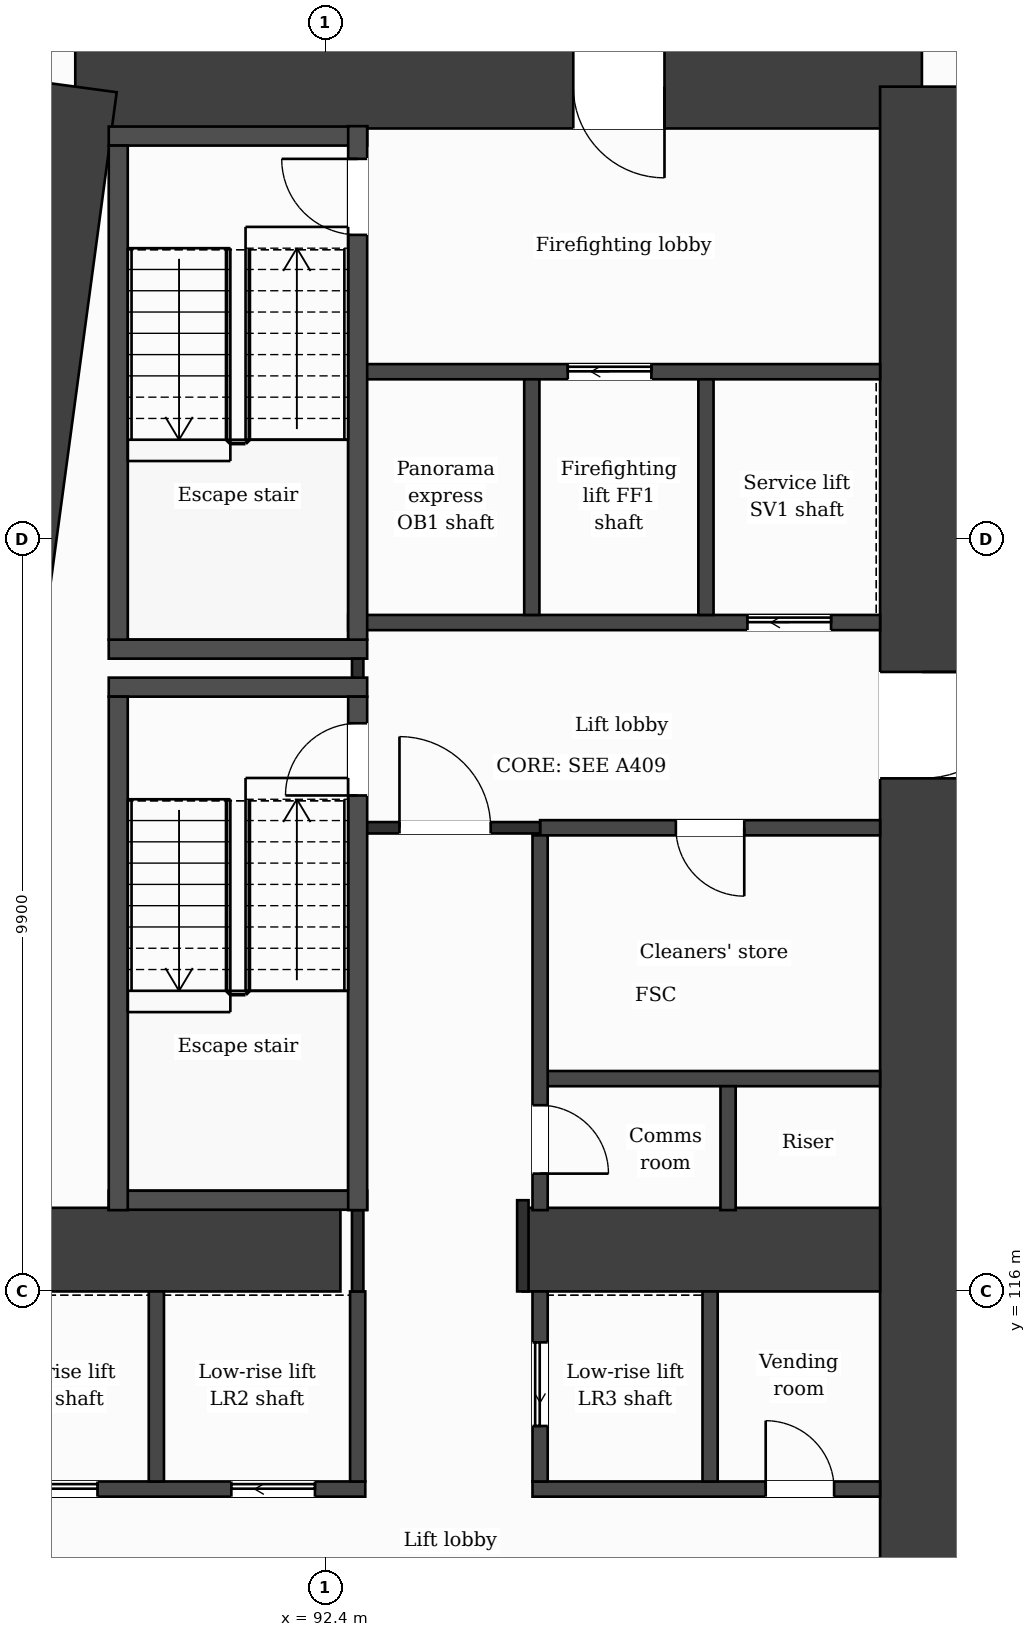
"""IFC4 building model, lengths in metres.
Left out: names, types, materials, properties, quantities, classifications, styles, units other than length and angle.
Written with IfcOpenShell. Run it as: python <this file> out.ifc"""

import sys

from ifc_helpers import new_model, si_unit, direction, frame, frame_2d, origin, place, context, subcontext, project, spatial, rectangle, extrude, element, fill, save


model = new_model("IFC4")
c1 = context("Model", 3, precision=1e-05, world=origin(), true_north=direction((0.0, 1.0)))
c2 = subcontext(c1, "Body", "Model", "MODEL_VIEW")
j1 = project(units=[si_unit("LENGTHUNIT", "METRE"), si_unit("PLANEANGLEUNIT", "RADIAN")], contexts=[c1])
p1 = place(None, origin())
s1 = spatial("IfcSite", under=j1, at=p1, CompositionType="ELEMENT")
p2 = place(p1, origin())
s2 = spatial("IfcBuilding", under=s1, at=p2, CompositionType="ELEMENT")
p3 = place(p2, frame((0.0, 0.0, 46.0)))
s3 = spatial("IfcBuildingStorey", under=s2, at=p3, CompositionType="ELEMENT", Elevation=46.0)
p4 = place(p3, frame((89.112, 131.85, 0.0), z_axis=(0.0, 0.0, 1.0), x_axis=(1.0, 0.0, 0.0)))
e1 = element("IfcWall", 1, at=p4, inside=s3, PredefinedType="SHEAR", context=c2, shape_type="SweptSolid", body=[
    extrude(rectangle(XDim=11.138, YDim=1.1, at=frame_2d((5.569, 0.0))), origin(), (0.0, 0.0, 1.0), 3.5),
])
p5 = place(p4, frame((6.552, 0.0, 0.0)))
e2 = element("IfcOpeningElement", 2, at=p5, cuts=e1, PredefinedType="OPENING", context=c2, shape_type="SweptSolid", body=[
    extrude(rectangle(XDim=1.2, YDim=2.1, at=frame_2d((0.6, 1.05))), frame((0.0, 0.56, 0.0), z_axis=(0.0, -1.0, 0.0), x_axis=(1.0, 0.0, 0.0)), (0.0, 0.0, 1.0), 1.12),
])
p6 = place(p3, frame((100.25, 131.85, 0.0), z_axis=(0.0, 0.0, 1.0), x_axis=(0.0, -1.0, 0.0)))
e3 = element("IfcWall", 3, at=p6, inside=s3, PredefinedType="SHEAR", context=c2, shape_type="SweptSolid", body=[
    extrude(rectangle(XDim=20.9, YDim=1.1, at=frame_2d((10.45, 0.0))), origin(), (0.0, 0.0, 1.0), 3.5),
])
p7 = place(p6, frame((7.7, 0.0, 0.0)))
e4 = element("IfcOpeningElement", 4, at=p7, cuts=e3, PredefinedType="OPENING", context=c2, shape_type="SweptSolid", body=[
    extrude(rectangle(XDim=1.4, YDim=2.1, at=frame_2d((0.7, 1.05))), frame((0.0, 0.56, 0.0), z_axis=(0.0, -1.0, 0.0), x_axis=(1.0, 0.0, 0.0)), (0.0, 0.0, 1.0), 1.12),
])
p8 = place(p3, frame((86.298, 110.95, 0.0), z_axis=(0.0, 0.0, 1.0), x_axis=(0.133400422634, 0.99106222168, 0.0)))
e5 = element("IfcWall", 5, at=p8, inside=s3, PredefinedType="SHEAR", context=c2, shape_type="SweptSolid", body=[
    extrude(rectangle(XDim=21.089, YDim=1.1, at=frame_2d((10.544, 0.0))), origin(), (0.0, 0.0, 1.0), 3.5),
])
p9 = place(p3, frame((87.523, 116.55, 0.0), z_axis=(0.0, 0.0, 1.0), x_axis=(1.0, 0.0, 0.0)))
e6 = element("IfcWall", 6, at=p9, inside=s3, PredefinedType="SHEAR", context=c2, shape_type="SweptSolid", body=[
    extrude(rectangle(XDim=5.077, YDim=1.1, at=frame_2d((2.539, 0.0))), origin(), (0.0, 0.0, 1.0), 3.5),
])
p10 = place(p3, frame((95.0, 116.55, 0.0), z_axis=(0.0, 0.0, 1.0), x_axis=(1.0, 0.0, 0.0)))
e7 = element("IfcWall", 7, at=p10, inside=s3, PredefinedType="SHEAR", context=c2, shape_type="SweptSolid", body=[
    extrude(rectangle(XDim=4.7, YDim=1.1, at=frame_2d((2.35, 0.0))), origin(), (0.0, 0.0, 1.0), 3.5),
])
p11 = place(p3, frame((87.153, 113.4, 0.0), z_axis=(0.0, 0.0, 1.0), x_axis=(1.0, 0.0, 0.0)))
e8 = element("IfcWall", 8, at=p11, inside=s3, PredefinedType="PARTITIONING", context=c2, shape_type="SweptSolid", body=[
    extrude(rectangle(XDim=5.774, YDim=0.2, at=frame_2d((2.887, 0.0))), origin(), (0.0, 0.0, 1.0), 3.18),
])
p12 = place(p11, frame((1.151, 0.0, 0.0)))
e9 = element("IfcOpeningElement", 9, at=p12, cuts=e8, PredefinedType="OPENING", context=c2, shape_type="SweptSolid", body=[
    extrude(rectangle(XDim=1.1, YDim=2.1, at=frame_2d((0.55, 1.05))), frame((0.0, 0.11, 0.0), z_axis=(0.0, -1.0, 0.0), x_axis=(1.0, 0.0, 0.0)), (0.0, 0.0, 1.0), 0.22),
])
p13 = place(p11, frame((4.012, 0.0, 0.0)))
e10 = element("IfcOpeningElement", 10, at=p13, cuts=e8, PredefinedType="OPENING", context=c2, shape_type="SweptSolid", body=[
    extrude(rectangle(XDim=1.1, YDim=2.1, at=frame_2d((0.55, 1.05))), frame((0.0, 0.11, 0.0), z_axis=(0.0, -1.0, 0.0), x_axis=(1.0, 0.0, 0.0)), (0.0, 0.0, 1.0), 0.22),
])
p14 = place(p3, frame((95.127, 113.4, 0.0), z_axis=(0.0, 0.0, 1.0), x_axis=(1.0, 0.0, 0.0)))
e11 = element("IfcWall", 11, at=p14, inside=s3, PredefinedType="PARTITIONING", context=c2, shape_type="SweptSolid", body=[
    extrude(rectangle(XDim=4.573, YDim=0.2, at=frame_2d((2.287, 0.0))), origin(), (0.0, 0.0, 1.0), 3.18),
])
p15 = place(p14, frame((3.068, 0.0, 0.0)))
e12 = element("IfcOpeningElement", 12, at=p15, cuts=e11, PredefinedType="OPENING", context=c2, shape_type="SweptSolid", body=[
    extrude(rectangle(XDim=0.9, YDim=2.1, at=frame_2d((0.45, 1.05))), frame((0.0, 0.11, 0.0), z_axis=(0.0, -1.0, 0.0), x_axis=(1.0, 0.0, 0.0)), (0.0, 0.0, 1.0), 0.22),
])
p16 = place(p3, frame((89.552, 117.2, 0.0), z_axis=(0.0, 0.0, 1.0), x_axis=(1.0, 0.0, 0.0)))
e13 = element("IfcWall", 13, at=p16, inside=s3, PredefinedType="PARTITIONING", context=c2, shape_type="SweptSolid", body=[
    extrude(rectangle(XDim=3.4, YDim=0.25, at=frame_2d((1.7, 0.0))), origin(), (0.0, 0.0, 1.0), 3.18),
])
p17 = place(p3, frame((95.227, 118.8, 0.0), z_axis=(0.0, 0.0, 1.0), x_axis=(1.0, 0.0, 0.0)))
e14 = element("IfcWall", 14, at=p17, inside=s3, PredefinedType="PARTITIONING", context=c2, shape_type="SweptSolid", body=[
    extrude(rectangle(XDim=4.473, YDim=0.2, at=frame_2d((2.236, 0.0))), origin(), (0.0, 0.0, 1.0), 3.18),
])
p18 = place(p3, frame((95.227, 122.1, 0.0), z_axis=(0.0, 0.0, 1.0), x_axis=(1.0, 0.0, 0.0)))
e15 = element("IfcWall", 15, at=p18, inside=s3, PredefinedType="PARTITIONING", context=c2, shape_type="SweptSolid", body=[
    extrude(rectangle(XDim=4.473, YDim=0.2, at=frame_2d((2.236, 0.0))), origin(), (0.0, 0.0, 1.0), 3.18),
])
p19 = place(p18, frame((1.786, 0.0, 0.0)))
e16 = element("IfcOpeningElement", 16, at=p19, cuts=e15, PredefinedType="OPENING", context=c2, shape_type="SweptSolid", body=[
    extrude(rectangle(XDim=0.9, YDim=2.1, at=frame_2d((0.45, 1.05))), frame((0.0, 0.11, 0.0), z_axis=(0.0, -1.0, 0.0), x_axis=(1.0, 0.0, 0.0)), (0.0, 0.0, 1.0), 0.22),
])
p20 = place(p3, frame((92.827, 122.1, 0.0), z_axis=(0.0, 0.0, 1.0), x_axis=(1.0, 0.0, 0.0)))
e17 = element("IfcWall", 17, at=p20, inside=s3, PredefinedType="PARTITIONING", context=c2, shape_type="SweptSolid", body=[
    extrude(rectangle(XDim=2.4, YDim=0.15, at=frame_2d((1.2, 0.0))), origin(), (0.0, 0.0, 1.0), 3.18),
])
p21 = place(p20, frame((0.55, 0.0, 0.0)))
e18 = element("IfcOpeningElement", 18, at=p21, cuts=e17, PredefinedType="OPENING", context=c2, shape_type="SweptSolid", body=[
    extrude(rectangle(XDim=1.2, YDim=2.1, at=frame_2d((0.6, 1.05))), frame((0.0, 0.085, 0.0), z_axis=(0.0, -1.0, 0.0), x_axis=(1.0, 0.0, 0.0)), (0.0, 0.0, 1.0), 0.17),
])
for number, where, z_axis, x_axis in (
    (19, (89.552, 123.95, 0.0), (0.0, 0.0, 1.0), (1.0, 0.0, 0.0)),
    (20, (89.552, 124.45, 0.0), (0.0, 0.0, 1.0), (1.0, 0.0, 0.0)),
):
    element("IfcWall", number, at=place(p3, frame(where, z_axis=z_axis, x_axis=x_axis)), inside=s3, PredefinedType="PARTITIONING", context=c2, shape_type="SweptSolid", body=[
        extrude(rectangle(XDim=3.4, YDim=0.25, at=frame_2d((1.7, 0.0))), origin(), (0.0, 0.0, 1.0), 3.18),
    ])
p22 = place(p3, frame((92.702, 124.8, 0.0), z_axis=(0.0, 0.0, 1.0), x_axis=(1.0, 0.0, 0.0)))
e21 = element("IfcWall", 21, at=p22, inside=s3, PredefinedType="PARTITIONING", context=c2, shape_type="SweptSolid", body=[
    extrude(rectangle(XDim=6.998, YDim=0.2, at=frame_2d((3.499, 0.0))), origin(), (0.0, 0.0, 1.0), 3.18),
])
p23 = place(p22, frame((5.253, 0.0, 0.0)))
e22 = element("IfcOpeningElement", 22, at=p23, cuts=e21, PredefinedType="OPENING", context=c2, shape_type="SweptSolid", body=[
    extrude(rectangle(XDim=1.1, YDim=2.1, at=frame_2d((0.55, 1.05))), frame((0.0, 0.11, 0.0), z_axis=(0.0, -1.0, 0.0), x_axis=(1.0, 0.0, 0.0)), (0.0, 0.0, 1.0), 0.22),
])
p24 = place(p3, frame((92.827, 128.1, 0.0), z_axis=(0.0, 0.0, 1.0), x_axis=(1.0, 0.0, 0.0)))
e23 = element("IfcWall", 23, at=p24, inside=s3, PredefinedType="PARTITIONING", context=c2, shape_type="SweptSolid", body=[
    extrude(rectangle(XDim=6.873, YDim=0.2, at=frame_2d((3.437, 0.0))), origin(), (0.0, 0.0, 1.0), 3.18),
])
p25 = place(p24, frame((2.764, 0.0, 0.0)))
e24 = element("IfcOpeningElement", 24, at=p25, cuts=e23, PredefinedType="OPENING", context=c2, shape_type="SweptSolid", body=[
    extrude(rectangle(XDim=1.1, YDim=2.1, at=frame_2d((0.55, 1.05))), frame((0.0, 0.11, 0.0), z_axis=(0.0, -1.0, 0.0), x_axis=(1.0, 0.0, 0.0)), (0.0, 0.0, 1.0), 0.22),
])
p26 = place(p3, frame((89.552, 131.2, 0.0), z_axis=(0.0, 0.0, 1.0), x_axis=(1.0, 0.0, 0.0)))
e25 = element("IfcWall", 25, at=p26, inside=s3, PredefinedType="PARTITIONING", context=c2, shape_type="SweptSolid", body=[
    extrude(rectangle(XDim=3.4, YDim=0.25, at=frame_2d((1.7, 0.0))), origin(), (0.0, 0.0, 1.0), 3.18),
])
p27 = place(p3, frame((89.677, 117.07, 0.0), z_axis=(0.0, 0.0, 1.0), x_axis=(0.0, 1.0, 0.0)))
e26 = element("IfcWall", 26, at=p27, inside=s3, PredefinedType="PARTITIONING", context=c2, shape_type="SweptSolid", body=[
    extrude(rectangle(XDim=6.755, YDim=0.25, at=frame_2d((3.377, 0.0))), origin(), (0.0, 0.0, 1.0), 3.18),
])
p28 = place(p3, frame((89.677, 124.575, 0.0), z_axis=(0.0, 0.0, 1.0), x_axis=(0.0, 1.0, 0.0)))
e27 = element("IfcWall", 27, at=p28, inside=s3, PredefinedType="PARTITIONING", context=c2, shape_type="SweptSolid", body=[
    extrude(rectangle(XDim=6.5, YDim=0.25, at=frame_2d((3.25, 0.0))), origin(), (0.0, 0.0, 1.0), 3.18),
])
for number, where, z_axis, x_axis in (
    (28, (90.178, 113.5, 0.0), (0.0, 0.0, 1.0), (0.0, 1.0, 0.0)),
    (29, (92.827, 113.5, 0.0), (0.0, 0.0, 1.0), (0.0, 1.0, 0.0)),
):
    element("IfcWall", number, at=place(p3, frame(where, z_axis=z_axis, x_axis=x_axis)), inside=s3, PredefinedType="PARTITIONING", context=c2, shape_type="SweptSolid", body=[
        extrude(rectangle(XDim=2.5, YDim=0.2, at=frame_2d((1.25, 0.0))), origin(), (0.0, 0.0, 1.0), 3.18),
    ])
p29 = place(p3, frame((92.827, 116.0, 0.0), z_axis=(0.0, 0.0, 1.0), x_axis=(0.0, 1.0, 0.0)))
e30 = element("IfcWall", 30, at=p29, inside=s3, PredefinedType="PARTITIONING", context=c2, shape_type="SweptSolid", body=[
    extrude(rectangle(XDim=1.07, YDim=0.15, at=frame_2d((0.535, 0.0))), origin(), (0.0, 0.0, 1.0), 3.18),
])
p30 = place(p3, frame((92.827, 124.075, 0.0), z_axis=(0.0, 0.0, 1.0), x_axis=(0.0, 1.0, 0.0)))
e31 = element("IfcWall", 31, at=p30, inside=s3, PredefinedType="PARTITIONING", context=c2, shape_type="SweptSolid", body=[
    extrude(rectangle(XDim=0.25, YDim=0.15, at=frame_2d((0.125, 0.0))), origin(), (0.0, 0.0, 1.0), 3.18),
])
p31 = place(p3, frame((92.827, 117.07, 0.0), z_axis=(0.0, 0.0, 1.0), x_axis=(0.0, 1.0, 0.0)))
e32 = element("IfcWall", 32, at=p31, inside=s3, PredefinedType="PARTITIONING", context=c2, shape_type="SweptSolid", body=[
    extrude(rectangle(XDim=6.755, YDim=0.25, at=frame_2d((3.377, 0.0))), origin(), (0.0, 0.0, 1.0), 3.18),
])
p32 = place(p31, frame((5.455, 0.0, 0.0)))
e33 = element("IfcOpeningElement", 33, at=p32, cuts=e32, PredefinedType="OPENING", context=c2, shape_type="SweptSolid", body=[
    extrude(rectangle(XDim=0.95, YDim=2.1, at=frame_2d((0.475, 1.05))), frame((0.0, 0.135, 0.0), z_axis=(0.0, -1.0, 0.0), x_axis=(1.0, 0.0, 0.0)), (0.0, 0.0, 1.0), 0.27),
])
p33 = place(p3, frame((92.827, 124.575, 0.0), z_axis=(0.0, 0.0, 1.0), x_axis=(0.0, 1.0, 0.0)))
e34 = element("IfcWall", 34, at=p33, inside=s3, PredefinedType="PARTITIONING", context=c2, shape_type="SweptSolid", body=[
    extrude(rectangle(XDim=6.755, YDim=0.25, at=frame_2d((3.377, 0.0))), origin(), (0.0, 0.0, 1.0), 3.18),
])
p34 = place(p33, frame((5.325, 0.0, 0.0)))
e35 = element("IfcOpeningElement", 35, at=p34, cuts=e34, PredefinedType="OPENING", context=c2, shape_type="SweptSolid", body=[
    extrude(rectangle(XDim=1.0, YDim=2.1, at=frame_2d((0.5, 1.05))), frame((0.0, 0.135, 0.0), z_axis=(0.0, -1.0, 0.0), x_axis=(1.0, 0.0, 0.0)), (0.0, 0.0, 1.0), 0.27),
])
p35 = place(p3, frame((95.0, 116.0, 0.0), z_axis=(0.0, 0.0, 1.0), x_axis=(0.0, 1.0, 0.0)))
e36 = element("IfcWall", 36, at=p35, inside=s3, PredefinedType="PARTITIONING", context=c2, shape_type="SweptSolid", body=[
    extrude(rectangle(XDim=1.2, YDim=0.15, at=frame_2d((0.6, 0.0))), origin(), (0.0, 0.0, 1.0), 3.18),
])
p36 = place(p3, frame((95.118, 124.9, 0.0), z_axis=(0.0, 0.0, 1.0), x_axis=(0.0, 1.0, 0.0)))
e37 = element("IfcWall", 37, at=p36, inside=s3, PredefinedType="PARTITIONING", context=c2, shape_type="SweptSolid", body=[
    extrude(rectangle(XDim=3.1, YDim=0.2, at=frame_2d((1.55, 0.0))), origin(), (0.0, 0.0, 1.0), 3.18),
])
p37 = place(p3, frame((95.227, 113.5, 0.0), z_axis=(0.0, 0.0, 1.0), x_axis=(0.0, 1.0, 0.0)))
e38 = element("IfcWall", 38, at=p37, inside=s3, PredefinedType="PARTITIONING", context=c2, shape_type="SweptSolid", body=[
    extrude(rectangle(XDim=2.5, YDim=0.2, at=frame_2d((1.25, 0.0))), origin(), (0.0, 0.0, 1.0), 3.18),
])
p38 = place(p37, frame((0.73, 0.0, 0.0)))
e39 = element("IfcOpeningElement", 39, at=p38, cuts=e38, PredefinedType="OPENING", context=c2, shape_type="SweptSolid", body=[
    extrude(rectangle(XDim=1.1, YDim=2.1, at=frame_2d((0.55, 1.05))), frame((0.0, 0.11, 0.0), z_axis=(0.0, -1.0, 0.0), x_axis=(1.0, 0.0, 0.0)), (0.0, 0.0, 1.0), 0.22),
])
p39 = place(p3, frame((95.227, 117.07, 0.0), z_axis=(0.0, 0.0, 1.0), x_axis=(0.0, 1.0, 0.0)))
e40 = element("IfcWall", 40, at=p39, inside=s3, PredefinedType="PARTITIONING", context=c2, shape_type="SweptSolid", body=[
    extrude(rectangle(XDim=4.93, YDim=0.2, at=frame_2d((2.465, 0.0))), origin(), (0.0, 0.0, 1.0), 3.18),
])
p40 = place(p39, frame((0.48, 0.0, 0.0)))
e41 = element("IfcOpeningElement", 41, at=p40, cuts=e40, PredefinedType="OPENING", context=c2, shape_type="SweptSolid", body=[
    extrude(rectangle(XDim=0.9, YDim=2.1, at=frame_2d((0.45, 1.05))), frame((0.0, 0.11, 0.0), z_axis=(0.0, -1.0, 0.0), x_axis=(1.0, 0.0, 0.0)), (0.0, 0.0, 1.0), 0.22),
])
p41 = place(p3, frame((97.409, 124.9, 0.0), z_axis=(0.0, 0.0, 1.0), x_axis=(0.0, 1.0, 0.0)))
e42 = element("IfcWall", 42, at=p41, inside=s3, PredefinedType="PARTITIONING", context=c2, shape_type="SweptSolid", body=[
    extrude(rectangle(XDim=3.1, YDim=0.2, at=frame_2d((1.55, 0.0))), origin(), (0.0, 0.0, 1.0), 3.18),
])
p42 = place(p3, frame((97.463, 113.5, 0.0), z_axis=(0.0, 0.0, 1.0), x_axis=(0.0, 1.0, 0.0)))
e43 = element("IfcWall", 43, at=p42, inside=s3, PredefinedType="PARTITIONING", context=c2, shape_type="SweptSolid", body=[
    extrude(rectangle(XDim=2.5, YDim=0.2, at=frame_2d((1.25, 0.0))), origin(), (0.0, 0.0, 1.0), 3.18),
])
p43 = place(p3, frame((97.7, 117.07, 0.0), z_axis=(0.0, 0.0, 1.0), x_axis=(0.0, 1.0, 0.0)))
e44 = element("IfcWall", 44, at=p43, inside=s3, PredefinedType="PARTITIONING", context=c2, shape_type="SweptSolid", body=[
    extrude(rectangle(XDim=1.63, YDim=0.2, at=frame_2d((0.815, 0.0))), origin(), (0.0, 0.0, 1.0), 3.18),
])
p44 = place(p21, origin())
e45 = element("IfcDoor", 45, at=p44, inside=s3, OperationType="SINGLE_SWING_LEFT", PredefinedType="DOOR", context=c2, shape_type="SweptSolid", body=[
    extrude(rectangle(XDim=1.2, YDim=2.1, at=frame_2d((0.6, 1.05))), frame((0.0, 0.025, 0.0), z_axis=(0.0, -1.0, 0.0), x_axis=(1.0, 0.0, 0.0)), (0.0, 0.0, 1.0), 0.05),
])
fill(e18, e45)
p45 = place(p25, origin())
e46 = element("IfcDoor", 46, at=p45, inside=s3, OperationType="SLIDING_TO_LEFT", PredefinedType="DOOR", context=c2, shape_type="SweptSolid", body=[
    extrude(rectangle(XDim=1.1, YDim=2.1, at=frame_2d((0.55, 1.05))), frame((0.0, 0.025, 0.0), z_axis=(0.0, -1.0, 0.0), x_axis=(1.0, 0.0, 0.0)), (0.0, 0.0, 1.0), 0.05),
])
fill(e24, e46)
p46 = place(p23, origin())
e47 = element("IfcDoor", 47, at=p46, inside=s3, OperationType="SLIDING_TO_LEFT", PredefinedType="DOOR", context=c2, shape_type="SweptSolid", body=[
    extrude(rectangle(XDim=1.1, YDim=2.1, at=frame_2d((0.55, 1.05))), frame((0.0, 0.025, 0.0), z_axis=(0.0, -1.0, 0.0), x_axis=(1.0, 0.0, 0.0)), (0.0, 0.0, 1.0), 0.05),
])
fill(e22, e47)
p47 = place(p19, origin())
e48 = element("IfcDoor", 48, at=p47, inside=s3, OperationType="SINGLE_SWING_RIGHT", PredefinedType="DOOR", context=c2, shape_type="SweptSolid", body=[
    extrude(rectangle(XDim=0.9, YDim=2.1, at=frame_2d((0.45, 1.05))), frame((0.0, 0.025, 0.0), z_axis=(0.0, -1.0, 0.0), x_axis=(1.0, 0.0, 0.0)), (0.0, 0.0, 1.0), 0.05),
])
fill(e16, e48)
p48 = place(p32, origin())
e49 = element("IfcDoor", 49, at=p48, inside=s3, OperationType="SINGLE_SWING_LEFT", PredefinedType="DOOR", context=c2, shape_type="SweptSolid", body=[
    extrude(rectangle(XDim=0.95, YDim=2.1, at=frame_2d((0.475, 1.05))), frame((0.0, 0.025, 0.0), z_axis=(0.0, -1.0, 0.0), x_axis=(1.0, 0.0, 0.0)), (0.0, 0.0, 1.0), 0.05),
])
fill(e33, e49)
p49 = place(p34, origin())
e50 = element("IfcDoor", 50, at=p49, inside=s3, OperationType="SINGLE_SWING_RIGHT", PredefinedType="DOOR", context=c2, shape_type="SweptSolid", body=[
    extrude(rectangle(XDim=1.0, YDim=2.1, at=frame_2d((0.5, 1.05))), frame((0.0, 0.025, 0.0), z_axis=(0.0, -1.0, 0.0), x_axis=(1.0, 0.0, 0.0)), (0.0, 0.0, 1.0), 0.05),
])
fill(e35, e50)
p50 = place(p40, origin())
e51 = element("IfcDoor", 51, at=p50, inside=s3, OperationType="SINGLE_SWING_LEFT", PredefinedType="DOOR", context=c2, shape_type="SweptSolid", body=[
    extrude(rectangle(XDim=0.9, YDim=2.1, at=frame_2d((0.45, 1.05))), frame((0.0, 0.025, 0.0), z_axis=(0.0, -1.0, 0.0), x_axis=(1.0, 0.0, 0.0)), (0.0, 0.0, 1.0), 0.05),
])
fill(e41, e51)
p51 = place(p12, origin())
e52 = element("IfcDoor", 52, at=p51, inside=s3, OperationType="SLIDING_TO_LEFT", PredefinedType="DOOR", context=c2, shape_type="SweptSolid", body=[
    extrude(rectangle(XDim=1.1, YDim=2.1, at=frame_2d((0.55, 1.05))), frame((0.0, 0.025, 0.0), z_axis=(0.0, -1.0, 0.0), x_axis=(1.0, 0.0, 0.0)), (0.0, 0.0, 1.0), 0.05),
])
fill(e9, e52)
p52 = place(p13, origin())
e53 = element("IfcDoor", 53, at=p52, inside=s3, OperationType="SLIDING_TO_LEFT", PredefinedType="DOOR", context=c2, shape_type="SweptSolid", body=[
    extrude(rectangle(XDim=1.1, YDim=2.1, at=frame_2d((0.55, 1.05))), frame((0.0, 0.025, 0.0), z_axis=(0.0, -1.0, 0.0), x_axis=(1.0, 0.0, 0.0)), (0.0, 0.0, 1.0), 0.05),
])
fill(e10, e53)
p53 = place(p38, origin())
e54 = element("IfcDoor", 54, at=p53, inside=s3, OperationType="SLIDING_TO_LEFT", PredefinedType="DOOR", context=c2, shape_type="SweptSolid", body=[
    extrude(rectangle(XDim=1.1, YDim=2.1, at=frame_2d((0.55, 1.05))), frame((0.0, 0.025, 0.0), z_axis=(0.0, -1.0, 0.0), x_axis=(1.0, 0.0, 0.0)), (0.0, 0.0, 1.0), 0.05),
])
fill(e39, e54)
p54 = place(p15, origin())
e55 = element("IfcDoor", 55, at=p54, inside=s3, OperationType="SINGLE_SWING_LEFT", PredefinedType="DOOR", context=c2, shape_type="SweptSolid", body=[
    extrude(rectangle(XDim=0.9, YDim=2.1, at=frame_2d((0.45, 1.05))), frame((0.0, 0.025, 0.0), z_axis=(0.0, -1.0, 0.0), x_axis=(1.0, 0.0, 0.0)), (0.0, 0.0, 1.0), 0.05),
])
fill(e12, e55)
p55 = place(p5, origin())
e56 = element("IfcDoor", 56, at=p55, inside=s3, OperationType="SINGLE_SWING_RIGHT", PredefinedType="DOOR", context=c2, shape_type="SweptSolid", body=[
    extrude(rectangle(XDim=1.2, YDim=2.1, at=frame_2d((0.6, 1.05))), frame((0.0, 0.025, 0.0), z_axis=(0.0, -1.0, 0.0), x_axis=(1.0, 0.0, 0.0)), (0.0, 0.0, 1.0), 0.05),
])
fill(e2, e56)
p56 = place(p7, origin())
e57 = element("IfcDoor", 57, at=p56, inside=s3, OperationType="SINGLE_SWING_LEFT", PredefinedType="DOOR", context=c2, shape_type="SweptSolid", body=[
    extrude(rectangle(XDim=1.4, YDim=2.1, at=frame_2d((0.7, 1.05))), frame((0.0, 0.025, 0.0), z_axis=(0.0, -1.0, 0.0), x_axis=(1.0, 0.0, 0.0)), (0.0, 0.0, 1.0), 0.05),
])
fill(e4, e57)
save(model, sys.argv[1])
